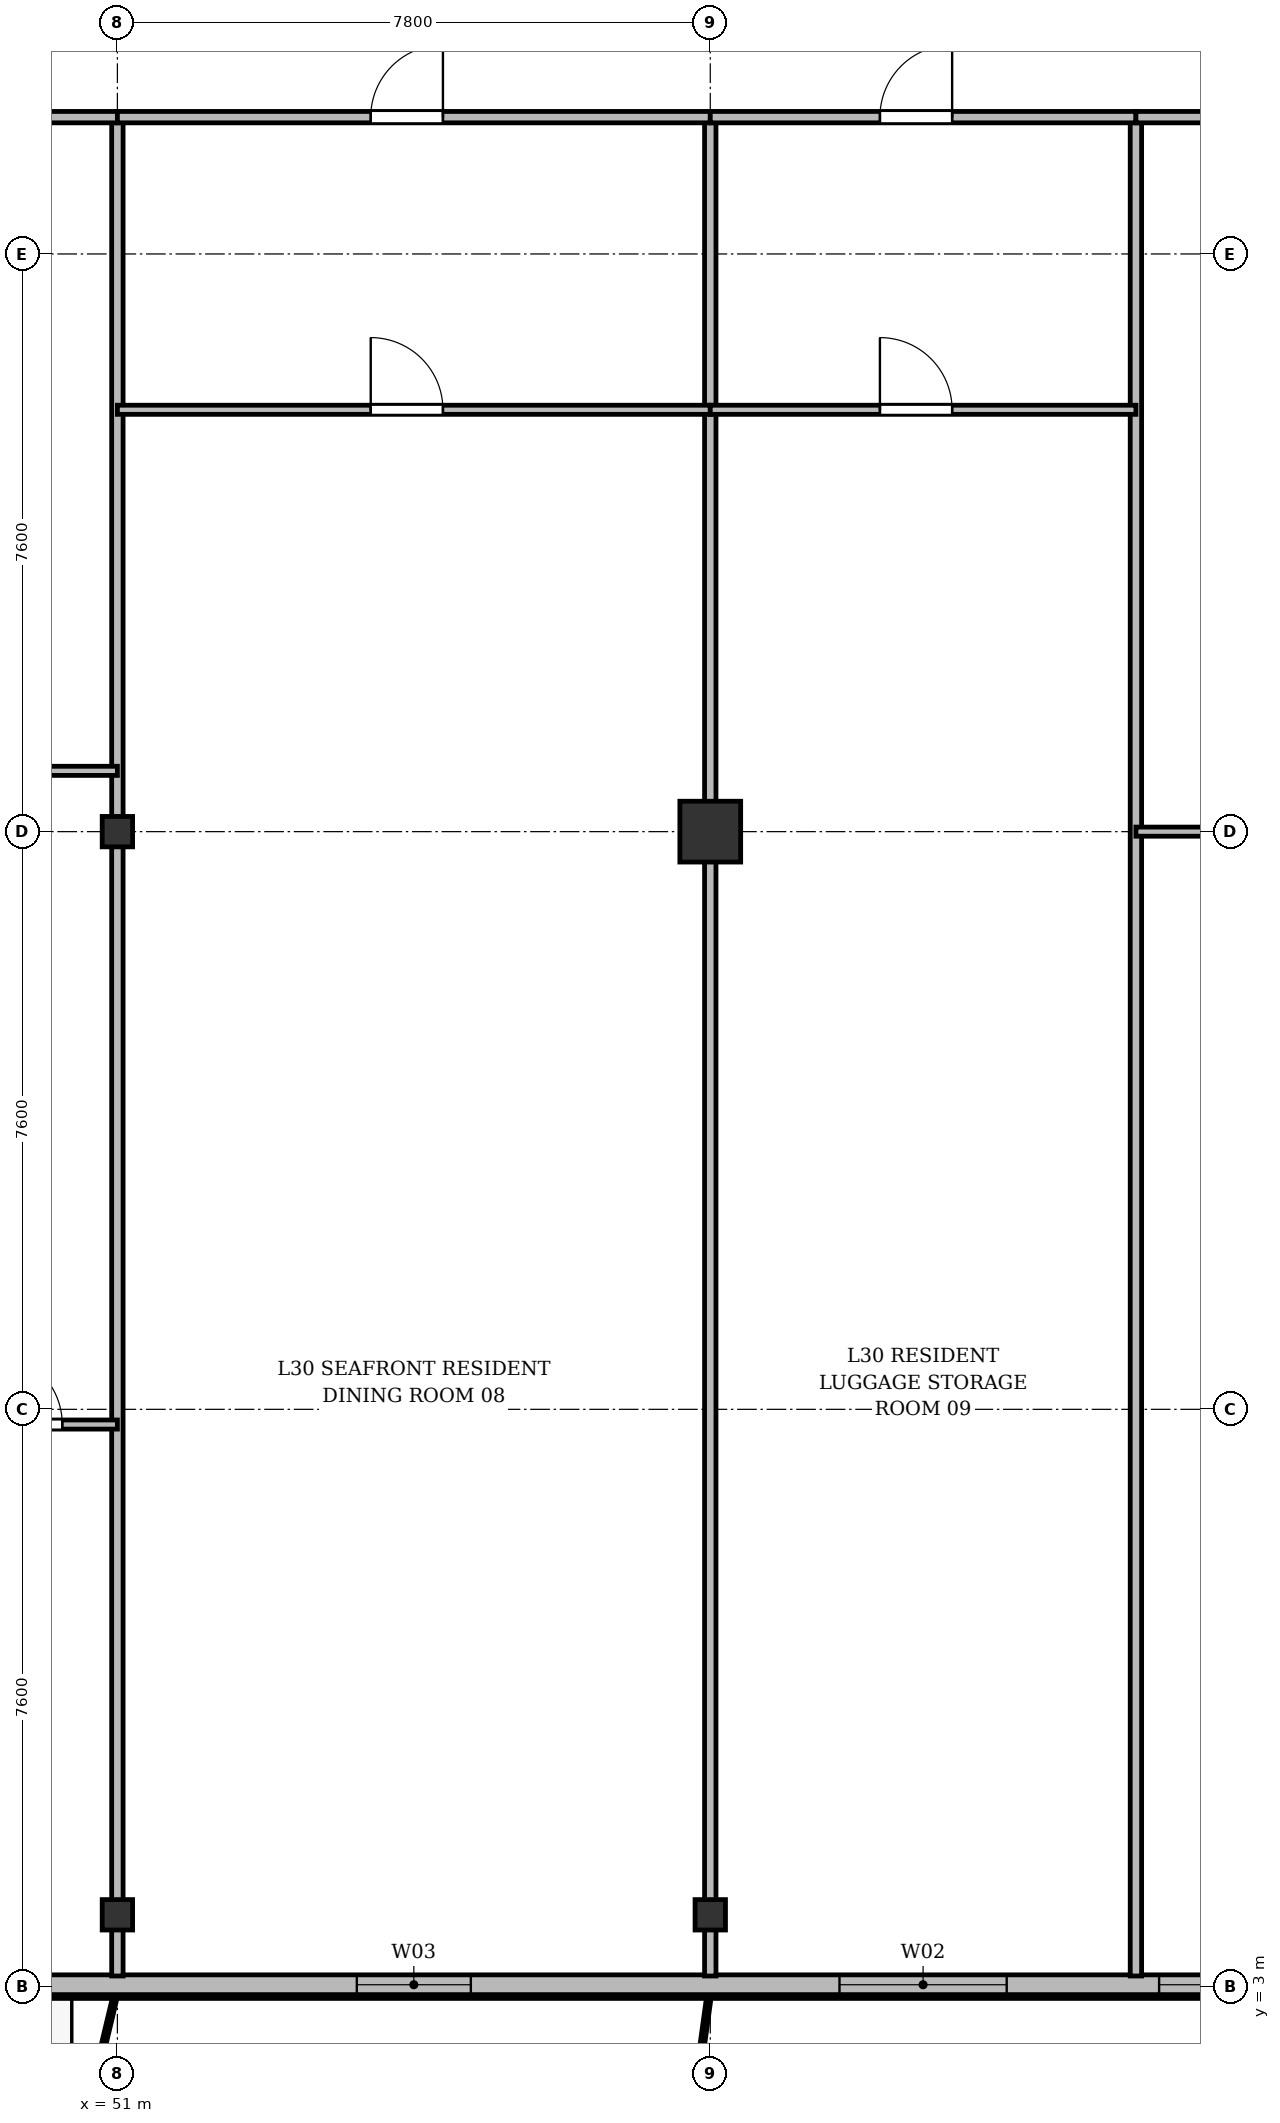
"""IFC4 building model, lengths in metres.
Left out: names, types, materials, properties, quantities, classifications, styles, units other than length and angle.
Written with IfcOpenShell. Run it as: python <this file> out.ifc"""

import sys

from ifc_helpers import new_model, si_unit, direction, frame, frame_2d, origin, origin_2d, place, context, subcontext, project, spatial, rectangle, i_section, extrude, source, transform, mapped, element, fill, save


model = new_model("IFC4")
c1 = context("Model", 3, precision=1e-05, world=origin(), true_north=direction((0.0, 1.0)))
c2 = subcontext(c1, "Body", "Model", "MODEL_VIEW")
j1 = project(units=[si_unit("LENGTHUNIT", "METRE"), si_unit("PLANEANGLEUNIT", "RADIAN")], contexts=[c1])
p1 = place(None, origin())
s1 = spatial("IfcSite", under=j1, at=p1, CompositionType="ELEMENT")
p2 = place(p1, origin())
s2 = spatial("IfcBuilding", under=s1, at=p2, CompositionType="ELEMENT")
p3 = place(p2, frame((0.0, 0.0, 117.7)))
s3 = spatial("IfcBuildingStorey", under=s2, at=p3, CompositionType="ELEMENT", Elevation=117.7)
m1 = source(origin(), c2, "Body", "SweptSolid", [
    extrude(i_section(OverallWidth=0.4, OverallDepth=0.4, WebThickness=0.022, FlangeThickness=0.035, at=origin_2d()), origin(), (0.0, 0.0, 1.0), 3.6),
])
for number, where, z_axis, x_axis in (
    (1, (51.0, 3.95, 0.0), (0.0, 0.0, 1.0), (1.0, 0.0, 0.0)),
    (2, (51.0, 18.2, 0.0), (0.0, 0.0, 1.0), (1.0, 0.0, 0.0)),
    (3, (58.8, 3.95, 0.0), (0.0, 0.0, 1.0), (1.0, 0.0, 0.0)),
):
    element("IfcColumn", number, at=place(p3, frame(where, z_axis=z_axis, x_axis=x_axis)), inside=s3, PredefinedType="COLUMN", context=c2, shape_type="MappedRepresentation", body=[
        mapped(m1, transform((0.0, 0.0, 0.0), x_axis=(1.0, 0.0, 0.0), y_axis=(0.0, 1.0, 0.0), z_axis=(0.0, 0.0, 1.0), scale=1.0)),
    ])
m2 = source(origin(), c2, "Body", "SweptSolid", [
    extrude(rectangle(XDim=0.8, YDim=0.8, at=origin_2d()), origin(), (0.0, 0.0, 1.0), 3.6),
])
p4 = place(p3, frame((58.8, 18.2, 0.0), z_axis=(0.0, 0.0, 1.0), x_axis=(1.0, 0.0, 0.0)))
e4 = element("IfcColumn", 4, at=p4, inside=s3, PredefinedType="COLUMN", context=c2, shape_type="MappedRepresentation", body=[
    mapped(m2, transform((0.0, 0.0, 0.0), x_axis=(1.0, 0.0, 0.0), y_axis=(0.0, 1.0, 0.0), z_axis=(0.0, 0.0, 1.0), scale=1.0)),
])
p5 = place(p3, frame((66.9, 3.03, 0.0), z_axis=(0.0, 0.0, 1.0), x_axis=(-1.0, 0.0, 0.0)))
e5 = element("IfcWall", 5, at=p5, inside=s3, PredefinedType="SOLIDWALL", context=c2, shape_type="SweptSolid", body=[
    extrude(rectangle(XDim=59.4, YDim=0.26, at=frame_2d((29.7, 0.0))), origin(), (0.0, 0.0, 1.0), 3.34),
])
p6 = place(p5, frame((0.395, 0.0, 0.9)))
e6 = element("IfcOpeningElement", 6, at=p6, cuts=e5, PredefinedType="OPENING", context=c2, shape_type="SweptSolid", body=[
    extrude(rectangle(XDim=1.8, YDim=1.8, at=frame_2d((0.9, 0.9))), frame((0.0, 0.14, 0.0), z_axis=(0.0, -1.0, 0.0), x_axis=(1.0, 0.0, 0.0)), (0.0, 0.0, 1.0), 0.28),
])
p7 = place(p5, frame((4.2, 0.0, 0.9)))
e7 = element("IfcOpeningElement", 7, at=p7, cuts=e5, PredefinedType="OPENING", context=c2, shape_type="SweptSolid", body=[
    extrude(rectangle(XDim=2.2, YDim=1.8, at=frame_2d((1.1, 0.9))), frame((0.0, 0.14, 0.0), z_axis=(0.0, -1.0, 0.0), x_axis=(1.0, 0.0, 0.0)), (0.0, 0.0, 1.0), 0.28),
])
p8 = place(p5, frame((11.25, 0.0, 0.9)))
e8 = element("IfcOpeningElement", 8, at=p8, cuts=e5, PredefinedType="OPENING", context=c2, shape_type="SweptSolid", body=[
    extrude(rectangle(XDim=1.5, YDim=1.75, at=frame_2d((0.75, 0.875))), frame((0.0, 0.14, 0.0), z_axis=(0.0, -1.0, 0.0), x_axis=(1.0, 0.0, 0.0)), (0.0, 0.0, 1.0), 0.28),
])
p9 = place(p5, frame((16.92, 0.0, 0.0)))
e9 = element("IfcOpeningElement", 9, at=p9, cuts=e5, PredefinedType="OPENING", context=c2, shape_type="SweptSolid", body=[
    extrude(rectangle(XDim=1.2, YDim=2.2, at=frame_2d((0.6, 1.1))), frame((0.0, 0.14, 0.0), z_axis=(0.0, -1.0, 0.0), x_axis=(1.0, 0.0, 0.0)), (0.0, 0.0, 1.0), 0.28),
])
p10 = place(p5, frame((18.675, 0.0, 0.9)))
e10 = element("IfcOpeningElement", 10, at=p10, cuts=e5, PredefinedType="OPENING", context=c2, shape_type="SweptSolid", body=[
    extrude(rectangle(XDim=1.65, YDim=1.85, at=frame_2d((0.825, 0.925))), frame((0.0, 0.14, 0.0), z_axis=(0.0, -1.0, 0.0), x_axis=(1.0, 0.0, 0.0)), (0.0, 0.0, 1.0), 0.28),
])
p11 = place(p5, frame((21.0, 0.0, 0.9)))
e11 = element("IfcOpeningElement", 11, at=p11, cuts=e5, PredefinedType="OPENING", context=c2, shape_type="SweptSolid", body=[
    extrude(rectangle(XDim=1.8, YDim=1.8, at=frame_2d((0.9, 0.9))), frame((0.0, 0.14, 0.0), z_axis=(0.0, -1.0, 0.0), x_axis=(1.0, 0.0, 0.0)), (0.0, 0.0, 1.0), 0.28),
])
p12 = place(p5, frame((26.3, 0.0, 0.9)))
e12 = element("IfcOpeningElement", 12, at=p12, cuts=e5, PredefinedType="OPENING", context=c2, shape_type="SweptSolid", body=[
    extrude(rectangle(XDim=2.2, YDim=1.8, at=frame_2d((1.1, 0.9))), frame((0.0, 0.14, 0.0), z_axis=(0.0, -1.0, 0.0), x_axis=(1.0, 0.0, 0.0)), (0.0, 0.0, 1.0), 0.28),
])
p13 = place(p5, frame((32.8, 0.0, 0.9)))
e13 = element("IfcOpeningElement", 13, at=p13, cuts=e5, PredefinedType="OPENING", context=c2, shape_type="SweptSolid", body=[
    extrude(rectangle(XDim=1.5, YDim=1.75, at=frame_2d((0.75, 0.875))), frame((0.0, 0.14, 0.0), z_axis=(0.0, -1.0, 0.0), x_axis=(1.0, 0.0, 0.0)), (0.0, 0.0, 1.0), 0.28),
])
p14 = place(p5, frame((36.25, 0.0, 0.9)))
e14 = element("IfcOpeningElement", 14, at=p14, cuts=e5, PredefinedType="OPENING", context=c2, shape_type="SweptSolid", body=[
    extrude(rectangle(XDim=2.0, YDim=1.95, at=frame_2d((1.0, 0.975))), frame((0.0, 0.14, 0.0), z_axis=(0.0, -1.0, 0.0), x_axis=(1.0, 0.0, 0.0)), (0.0, 0.0, 1.0), 0.28),
])
p15 = place(p5, frame((39.775, 0.0, 0.9)))
e15 = element("IfcOpeningElement", 15, at=p15, cuts=e5, PredefinedType="OPENING", context=c2, shape_type="SweptSolid", body=[
    extrude(rectangle(XDim=1.65, YDim=1.85, at=frame_2d((0.825, 0.925))), frame((0.0, 0.14, 0.0), z_axis=(0.0, -1.0, 0.0), x_axis=(1.0, 0.0, 0.0)), (0.0, 0.0, 1.0), 0.28),
])
p16 = place(p5, frame((42.7, 0.0, 0.9)))
e16 = element("IfcOpeningElement", 16, at=p16, cuts=e5, PredefinedType="OPENING", context=c2, shape_type="SweptSolid", body=[
    extrude(rectangle(XDim=1.8, YDim=1.8, at=frame_2d((0.9, 0.9))), frame((0.0, 0.14, 0.0), z_axis=(0.0, -1.0, 0.0), x_axis=(1.0, 0.0, 0.0)), (0.0, 0.0, 1.0), 0.28),
])
p17 = place(p5, frame((46.435, 0.0, 0.0)))
e17 = element("IfcOpeningElement", 17, at=p17, cuts=e5, PredefinedType="OPENING", context=c2, shape_type="SweptSolid", body=[
    extrude(rectangle(XDim=1.2, YDim=2.2, at=frame_2d((0.6, 1.1))), frame((0.0, 0.14, 0.0), z_axis=(0.0, -1.0, 0.0), x_axis=(1.0, 0.0, 0.0)), (0.0, 0.0, 1.0), 0.28),
])
p18 = place(p5, frame((49.0, 0.0, 0.9)))
e18 = element("IfcOpeningElement", 18, at=p18, cuts=e5, PredefinedType="OPENING", context=c2, shape_type="SweptSolid", body=[
    extrude(rectangle(XDim=1.5, YDim=1.75, at=frame_2d((0.75, 0.875))), frame((0.0, 0.14, 0.0), z_axis=(0.0, -1.0, 0.0), x_axis=(1.0, 0.0, 0.0)), (0.0, 0.0, 1.0), 0.28),
])
p19 = place(p5, frame((53.0, 0.0, 0.9)))
e19 = element("IfcOpeningElement", 19, at=p19, cuts=e5, PredefinedType="OPENING", context=c2, shape_type="SweptSolid", body=[
    extrude(rectangle(XDim=2.0, YDim=1.95, at=frame_2d((1.0, 0.975))), frame((0.0, 0.14, 0.0), z_axis=(0.0, -1.0, 0.0), x_axis=(1.0, 0.0, 0.0)), (0.0, 0.0, 1.0), 0.28),
])
p20 = place(p5, frame((57.18, 0.0, 0.9)))
e20 = element("IfcOpeningElement", 20, at=p20, cuts=e5, PredefinedType="OPENING", context=c2, shape_type="SweptSolid", body=[
    extrude(rectangle(XDim=1.65, YDim=1.85, at=frame_2d((0.825, 0.925))), frame((0.0, 0.14, 0.0), z_axis=(0.0, -1.0, 0.0), x_axis=(1.0, 0.0, 0.0)), (0.0, 0.0, 1.0), 0.28),
])
for number, where, z_axis, x_axis in (
    (21, (51.0, 3.145, 0.0), (0.0, 0.0, 1.0), (0.0, 1.0, 0.0)),
    (22, (58.8, 3.145, 0.0), (0.0, 0.0, 1.0), (0.0, 1.0, 0.0)),
):
    element("IfcWall", number, at=place(p3, frame(where, z_axis=z_axis, x_axis=x_axis)), inside=s3, PredefinedType="PARTITIONING", context=c2, shape_type="SweptSolid", body=[
        extrude(rectangle(XDim=24.455, YDim=0.15, at=frame_2d((12.228, 0.0))), origin(), (0.0, 0.0, 1.0), 2.84),
    ])
p21 = place(p3, frame((64.4, 3.145, 0.0), z_axis=(0.0, 0.0, 1.0), x_axis=(0.0, 1.0, 0.0)))
e23 = element("IfcWall", 23, at=p21, inside=s3, PredefinedType="PARTITIONING", context=c2, shape_type="SweptSolid", body=[
    extrude(rectangle(XDim=24.455, YDim=0.15, at=frame_2d((12.228, 0.0))), origin(), (0.0, 0.0, 1.0), 2.752),
])
p22 = place(p3, frame((43.8, 19.0, 0.0), z_axis=(0.0, 0.0, 1.0), x_axis=(1.0, 0.0, 0.0)))
e24 = element("IfcWall", 24, at=p22, inside=s3, PredefinedType="PARTITIONING", context=c2, shape_type="SweptSolid", body=[
    extrude(rectangle(XDim=7.2, YDim=0.12, at=frame_2d((3.6, 0.0))), origin(), (0.0, 0.0, 1.0), 2.84),
])
p23 = place(p22, frame((3.125, 0.0, 0.0)))
e25 = element("IfcOpeningElement", 25, at=p23, cuts=e24, PredefinedType="OPENING", context=c2, shape_type="SweptSolid", body=[
    extrude(rectangle(XDim=0.95, YDim=2.15, at=frame_2d((0.475, 1.075))), frame((0.0, 0.07, 0.0), z_axis=(0.0, -1.0, 0.0), x_axis=(1.0, 0.0, 0.0)), (0.0, 0.0, 1.0), 0.14),
])
p24 = place(p3, frame((43.8, 27.6, 0.0), z_axis=(0.0, 0.0, 1.0), x_axis=(1.0, 0.0, 0.0)))
e26 = element("IfcWall", 26, at=p24, inside=s3, PredefinedType="PARTITIONING", context=c2, shape_type="SweptSolid", body=[
    extrude(rectangle(XDim=7.2, YDim=0.15, at=frame_2d((3.6, 0.0))), origin(), (0.0, 0.0, 1.0), 2.84),
])
p25 = place(p24, frame((4.706, 0.0, 0.0)))
e27 = element("IfcOpeningElement", 27, at=p25, cuts=e26, PredefinedType="OPENING", context=c2, shape_type="SweptSolid", body=[
    extrude(rectangle(XDim=0.95, YDim=2.15, at=frame_2d((0.475, 1.075))), frame((0.0, 0.085, 0.0), z_axis=(0.0, -1.0, 0.0), x_axis=(1.0, 0.0, 0.0)), (0.0, 0.0, 1.0), 0.17),
])
p26 = place(p3, frame((48.6, 10.4, 0.0), z_axis=(0.0, 0.0, 1.0), x_axis=(1.0, 0.0, 0.0)))
e28 = element("IfcWall", 28, at=p26, inside=s3, PredefinedType="PARTITIONING", context=c2, shape_type="SweptSolid", body=[
    extrude(rectangle(XDim=2.4, YDim=0.12, at=frame_2d((1.2, 0.0))), origin(), (0.0, 0.0, 1.0), 2.84),
])
p27 = place(p26, frame((0.725, 0.0, 0.0)))
e29 = element("IfcOpeningElement", 29, at=p27, cuts=e28, PredefinedType="OPENING", context=c2, shape_type="SweptSolid", body=[
    extrude(rectangle(XDim=0.95, YDim=2.15, at=frame_2d((0.475, 1.075))), frame((0.0, 0.07, 0.0), z_axis=(0.0, -1.0, 0.0), x_axis=(1.0, 0.0, 0.0)), (0.0, 0.0, 1.0), 0.14),
])
p28 = place(p3, frame((51.0, 27.6, 0.0), z_axis=(0.0, 0.0, 1.0), x_axis=(1.0, 0.0, 0.0)))
e30 = element("IfcWall", 30, at=p28, inside=s3, PredefinedType="PARTITIONING", context=c2, shape_type="SweptSolid", body=[
    extrude(rectangle(XDim=7.8, YDim=0.15, at=frame_2d((3.9, 0.0))), origin(), (0.0, 0.0, 1.0), 2.84),
])
p29 = place(p28, frame((3.333, 0.0, 0.0)))
e31 = element("IfcOpeningElement", 31, at=p29, cuts=e30, PredefinedType="OPENING", context=c2, shape_type="SweptSolid", body=[
    extrude(rectangle(XDim=0.95, YDim=2.15, at=frame_2d((0.475, 1.075))), frame((0.0, 0.085, 0.0), z_axis=(0.0, -1.0, 0.0), x_axis=(1.0, 0.0, 0.0)), (0.0, 0.0, 1.0), 0.17),
])
p30 = place(p3, frame((51.0, 23.75, 0.0), z_axis=(0.0, 0.0, 1.0), x_axis=(1.0, 0.0, 0.0)))
e32 = element("IfcWall", 32, at=p30, inside=s3, PredefinedType="PARTITIONING", context=c2, shape_type="SweptSolid", body=[
    extrude(rectangle(XDim=7.8, YDim=0.12, at=frame_2d((3.9, 0.0))), origin(), (0.0, 0.0, 1.0), 2.84),
])
p31 = place(p30, frame((3.333, 0.0, 0.0)))
e33 = element("IfcOpeningElement", 33, at=p31, cuts=e32, PredefinedType="OPENING", context=c2, shape_type="SweptSolid", body=[
    extrude(rectangle(XDim=0.95, YDim=2.15, at=frame_2d((0.475, 1.075))), frame((0.0, 0.07, 0.0), z_axis=(0.0, -1.0, 0.0), x_axis=(1.0, 0.0, 0.0)), (0.0, 0.0, 1.0), 0.14),
])
p32 = place(p3, frame((58.8, 27.6, 0.0), z_axis=(0.0, 0.0, 1.0), x_axis=(1.0, 0.0, 0.0)))
e34 = element("IfcWall", 34, at=p32, inside=s3, PredefinedType="PARTITIONING", context=c2, shape_type="SweptSolid", body=[
    extrude(rectangle(XDim=5.6, YDim=0.15, at=frame_2d((2.8, 0.0))), origin(), (0.0, 0.0, 1.0), 2.84),
])
p33 = place(p32, frame((2.232, 0.0, 0.0)))
e35 = element("IfcOpeningElement", 35, at=p33, cuts=e34, PredefinedType="OPENING", context=c2, shape_type="SweptSolid", body=[
    extrude(rectangle(XDim=0.95, YDim=2.15, at=frame_2d((0.475, 1.075))), frame((0.0, 0.085, 0.0), z_axis=(0.0, -1.0, 0.0), x_axis=(1.0, 0.0, 0.0)), (0.0, 0.0, 1.0), 0.17),
])
p34 = place(p3, frame((58.8, 23.75, 0.0), z_axis=(0.0, 0.0, 1.0), x_axis=(1.0, 0.0, 0.0)))
e36 = element("IfcWall", 36, at=p34, inside=s3, PredefinedType="PARTITIONING", context=c2, shape_type="SweptSolid", body=[
    extrude(rectangle(XDim=5.6, YDim=0.12, at=frame_2d((2.8, 0.0))), origin(), (0.0, 0.0, 1.0), 2.84),
])
p35 = place(p34, frame((2.232, 0.0, 0.0)))
e37 = element("IfcOpeningElement", 37, at=p35, cuts=e36, PredefinedType="OPENING", context=c2, shape_type="SweptSolid", body=[
    extrude(rectangle(XDim=0.95, YDim=2.15, at=frame_2d((0.475, 1.075))), frame((0.0, 0.07, 0.0), z_axis=(0.0, -1.0, 0.0), x_axis=(1.0, 0.0, 0.0)), (0.0, 0.0, 1.0), 0.14),
])
p36 = place(p3, frame((64.4, 27.6, 0.0), z_axis=(0.0, 0.0, 1.0), x_axis=(1.0, 0.0, 0.0)))
e38 = element("IfcWall", 38, at=p36, inside=s3, PredefinedType="PARTITIONING", context=c2, shape_type="SweptSolid", body=[
    extrude(rectangle(XDim=5.255, YDim=0.15, at=frame_2d((2.627, 0.0))), origin(), (0.0, 0.0, 1.0), 2.84),
])
p37 = place(p36, frame((2.059, 0.0, 0.0)))
e39 = element("IfcOpeningElement", 39, at=p37, cuts=e38, PredefinedType="OPENING", context=c2, shape_type="SweptSolid", body=[
    extrude(rectangle(XDim=0.95, YDim=2.15, at=frame_2d((0.475, 1.075))), frame((0.0, 0.085, 0.0), z_axis=(0.0, -1.0, 0.0), x_axis=(1.0, 0.0, 0.0)), (0.0, 0.0, 1.0), 0.17),
])
p38 = place(p3, frame((64.4, 18.2, 0.0), z_axis=(0.0, 0.0, 1.0), x_axis=(1.0, 0.0, 0.0)))
e40 = element("IfcWall", 40, at=p38, inside=s3, PredefinedType="PARTITIONING", context=c2, shape_type="SweptSolid", body=[
    extrude(rectangle(XDim=5.255, YDim=0.12, at=frame_2d((2.627, 0.0))), origin(), (0.0, 0.0, 1.0), 2.752),
])
p39 = place(p38, frame((2.246, 0.0, 0.0)))
e41 = element("IfcOpeningElement", 41, at=p39, cuts=e40, PredefinedType="OPENING", context=c2, shape_type="SweptSolid", body=[
    extrude(rectangle(XDim=0.95, YDim=2.15, at=frame_2d((0.475, 1.075))), frame((0.0, 0.07, 0.0), z_axis=(0.0, -1.0, 0.0), x_axis=(1.0, 0.0, 0.0)), (0.0, 0.0, 1.0), 0.14),
])
m3 = source(origin(), c2, "Body", "SweptSolid", [
    extrude(rectangle(XDim=1.8, YDim=1.8, at=frame_2d((0.9, 0.9))), frame((0.0, 0.03, 0.0), z_axis=(0.0, -1.0, 0.0), x_axis=(1.0, 0.0, 0.0)), (0.0, 0.0, 1.0), 0.06),
])
p40 = place(p6, origin())
e42 = element("IfcWindow", 42, at=p40, inside=s3, PartitioningType="SINGLE_PANEL", PredefinedType="WINDOW", context=c2, shape_type="MappedRepresentation", body=[
    mapped(m3, transform((0.0, 0.0, 0.0), x_axis=(1.0, 0.0, 0.0), y_axis=(0.0, 1.0, 0.0), z_axis=(0.0, 0.0, 1.0), scale=1.0)),
])
fill(e6, e42)
m4 = source(origin(), c2, "Body", "SweptSolid", [
    extrude(rectangle(XDim=2.2, YDim=1.8, at=frame_2d((1.1, 0.9))), frame((0.0, 0.03, 0.0), z_axis=(0.0, -1.0, 0.0), x_axis=(1.0, 0.0, 0.0)), (0.0, 0.0, 1.0), 0.06),
])
p41 = place(p7, origin())
e43 = element("IfcWindow", 43, at=p41, inside=s3, PartitioningType="SINGLE_PANEL", PredefinedType="WINDOW", context=c2, shape_type="MappedRepresentation", body=[
    mapped(m4, transform((0.0, 0.0, 0.0), x_axis=(1.0, 0.0, 0.0), y_axis=(0.0, 1.0, 0.0), z_axis=(0.0, 0.0, 1.0), scale=1.0)),
])
fill(e7, e43)
m5 = source(origin(), c2, "Body", "SweptSolid", [
    extrude(rectangle(XDim=1.5, YDim=1.75, at=frame_2d((0.75, 0.875))), frame((0.0, 0.03, 0.0), z_axis=(0.0, -1.0, 0.0), x_axis=(1.0, 0.0, 0.0)), (0.0, 0.0, 1.0), 0.06),
])
p42 = place(p8, origin())
e44 = element("IfcWindow", 44, at=p42, inside=s3, PartitioningType="SINGLE_PANEL", PredefinedType="WINDOW", context=c2, shape_type="MappedRepresentation", body=[
    mapped(m5, transform((0.0, 0.0, 0.0), x_axis=(1.0, 0.0, 0.0), y_axis=(0.0, 1.0, 0.0), z_axis=(0.0, 0.0, 1.0), scale=1.0)),
])
fill(e8, e44)
m6 = source(origin(), c2, "Body", "SweptSolid", [
    extrude(rectangle(XDim=0.95, YDim=2.15, at=frame_2d((0.475, 1.075))), frame((0.0, 0.025, 0.0), z_axis=(0.0, -1.0, 0.0), x_axis=(1.0, 0.0, 0.0)), (0.0, 0.0, 1.0), 0.05),
])
p43 = place(p27, origin())
e45 = element("IfcDoor", 45, at=p43, inside=s3, OperationType="SINGLE_SWING_LEFT", PredefinedType="DOOR", context=c2, shape_type="MappedRepresentation", body=[
    mapped(m6, transform((0.0, 0.0, 0.0), x_axis=(1.0, 0.0, 0.0), y_axis=(0.0, 1.0, 0.0), z_axis=(0.0, 0.0, 1.0), scale=1.0)),
])
fill(e29, e45)
p44 = place(p29, origin())
e46 = element("IfcDoor", 46, at=p44, inside=s3, OperationType="SINGLE_SWING_RIGHT", PredefinedType="DOOR", context=c2, shape_type="MappedRepresentation", body=[
    mapped(m6, transform((0.0, 0.0, 0.0), x_axis=(1.0, 0.0, 0.0), y_axis=(0.0, 1.0, 0.0), z_axis=(0.0, 0.0, 1.0), scale=1.0)),
])
fill(e31, e46)
p45 = place(p31, origin())
e47 = element("IfcDoor", 47, at=p45, inside=s3, OperationType="SINGLE_SWING_LEFT", PredefinedType="DOOR", context=c2, shape_type="MappedRepresentation", body=[
    mapped(m6, transform((0.0, 0.0, 0.0), x_axis=(1.0, 0.0, 0.0), y_axis=(0.0, 1.0, 0.0), z_axis=(0.0, 0.0, 1.0), scale=1.0)),
])
fill(e33, e47)
p46 = place(p33, origin())
e48 = element("IfcDoor", 48, at=p46, inside=s3, OperationType="SINGLE_SWING_RIGHT", PredefinedType="DOOR", context=c2, shape_type="MappedRepresentation", body=[
    mapped(m6, transform((0.0, 0.0, 0.0), x_axis=(1.0, 0.0, 0.0), y_axis=(0.0, 1.0, 0.0), z_axis=(0.0, 0.0, 1.0), scale=1.0)),
])
fill(e35, e48)
p47 = place(p35, origin())
e49 = element("IfcDoor", 49, at=p47, inside=s3, OperationType="SINGLE_SWING_LEFT", PredefinedType="DOOR", context=c2, shape_type="MappedRepresentation", body=[
    mapped(m6, transform((0.0, 0.0, 0.0), x_axis=(1.0, 0.0, 0.0), y_axis=(0.0, 1.0, 0.0), z_axis=(0.0, 0.0, 1.0), scale=1.0)),
])
fill(e37, e49)
save(model, sys.argv[1])
